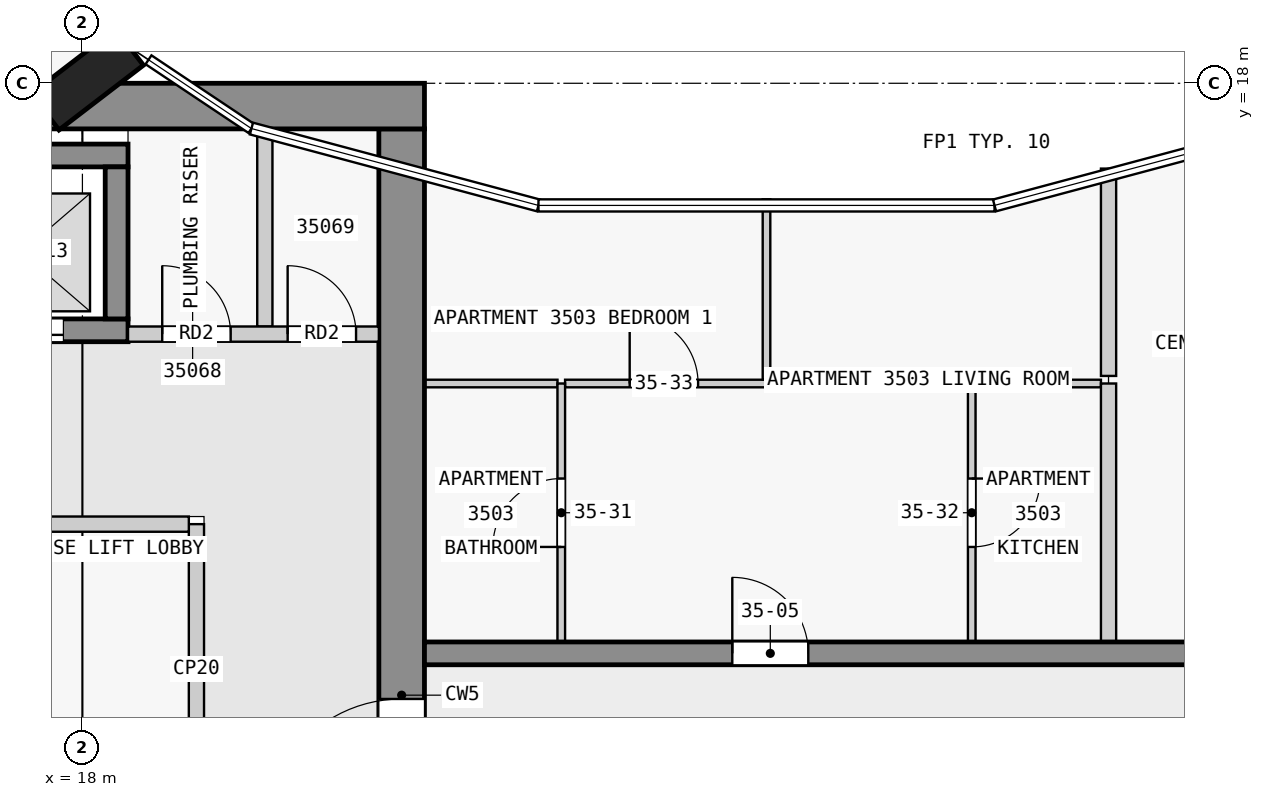
"""IFC4 building model, lengths in metres.
Left out: names, types, materials, properties, quantities, classifications, styles, units other than length and angle.
Written with IfcOpenShell. Run it as: python <this file> out.ifc"""

import sys

from ifc_helpers import new_model, si_unit, direction, frame, frame_2d, origin, origin_2d, place, context, subcontext, project, spatial, rectangle, extrude, element, fill, save


model = new_model("IFC4")
c1 = context("Model", 3, precision=1e-05, world=origin(), true_north=direction((0.0, 1.0)))
c2 = subcontext(c1, "Body", "Model", "MODEL_VIEW")
j1 = project(units=[si_unit("LENGTHUNIT", "METRE"), si_unit("PLANEANGLEUNIT", "RADIAN")], contexts=[c1])
p1 = place(None, origin())
s1 = spatial("IfcSite", under=j1, at=p1, CompositionType="ELEMENT")
p2 = place(p1, origin())
s2 = spatial("IfcBuilding", under=s1, at=p2, CompositionType="ELEMENT")
p3 = place(p2, frame((0.0, 0.0, 139.4)))
s3 = spatial("IfcBuildingStorey", under=s2, at=p3, CompositionType="ELEMENT", Elevation=139.4)
p4 = place(p3, frame((18.065, 18.05, 0.0), z_axis=(0.0, 0.0, 1.0), x_axis=(-0.608810846443, 0.793315418515, 0.0)))
e1 = element("IfcColumn", 1, at=p4, inside=s3, PredefinedType="COLUMN", context=c2, shape_type="SweptSolid", body=[
    extrude(rectangle(XDim=0.6, YDim=1.4, at=origin_2d()), origin(), (0.0, 0.0, 1.0), 3.5),
])
p5 = place(p3, frame((1.38, 17.7, 0.0), z_axis=(0.0, 0.0, 1.0), x_axis=(1.0, 0.0, 0.0)))
e2 = element("IfcWall", 2, at=p5, inside=s3, PredefinedType="SHEAR", context=c2, shape_type="SweptSolid", body=[
    extrude(rectangle(XDim=21.12, YDim=0.6, at=frame_2d((10.56, 0.0))), origin(), (0.0, 0.0, 1.0), 3.25),
])
p6 = place(p5, frame((6.4, 0.0, 0.0)))
e3 = element("IfcOpeningElement", 3, at=p6, cuts=e2, PredefinedType="OPENING", context=c2, shape_type="SweptSolid", body=[
    extrude(rectangle(XDim=1.8, YDim=2.1, at=frame_2d((0.9, 1.05))), frame((0.0, 0.31, 0.0), z_axis=(0.0, -1.0, 0.0), x_axis=(1.0, 0.0, 0.0)), (0.0, 0.0, 1.0), 0.62),
])
p7 = place(p3, frame((22.2, 2.5, 0.0), z_axis=(0.0, 0.0, 1.0), x_axis=(0.0, 1.0, 0.0)))
e4 = element("IfcWall", 4, at=p7, inside=s3, PredefinedType="SHEAR", context=c2, shape_type="SweptSolid", body=[
    extrude(rectangle(XDim=14.9, YDim=0.6, at=frame_2d((7.45, 0.0))), origin(), (0.0, 0.0, 1.0), 3.25),
])
p8 = place(p7, frame((5.6, 0.0, 0.0)))
e5 = element("IfcOpeningElement", 5, at=p8, cuts=e4, PredefinedType="OPENING", context=c2, shape_type="SweptSolid", body=[
    extrude(rectangle(XDim=1.8, YDim=2.1, at=frame_2d((0.9, 1.05))), frame((0.0, 0.31, 0.0), z_axis=(0.0, -1.0, 0.0), x_axis=(1.0, 0.0, 0.0)), (0.0, 0.0, 1.0), 0.62),
])
p9 = place(p3, frame((10.8, 17.05, 0.0), z_axis=(0.0, 0.0, 1.0), x_axis=(1.0, 0.0, 0.0)))
e6 = element("IfcWall", 6, at=p9, inside=s3, PredefinedType="SHEAR", context=c2, shape_type="SweptSolid", body=[
    extrude(rectangle(XDim=7.8, YDim=0.3, at=frame_2d((3.9, 0.0))), origin(), (0.0, 0.0, 1.0), 3.25),
])
p10 = place(p3, frame((10.8, 14.75, 0.0), z_axis=(0.0, 0.0, 1.0), x_axis=(1.0, 0.0, 0.0)))
e7 = element("IfcWall", 7, at=p10, inside=s3, PredefinedType="SHEAR", context=c2, shape_type="SweptSolid", body=[
    extrude(rectangle(XDim=7.8, YDim=0.3, at=frame_2d((3.9, 0.0))), origin(), (0.0, 0.0, 1.0), 3.25),
])
p11 = place(p10, frame((0.85, 0.0, 0.0)))
e8 = element("IfcOpeningElement", 8, at=p11, cuts=e7, PredefinedType="OPENING", context=c2, shape_type="SweptSolid", body=[
    extrude(rectangle(XDim=1.1, YDim=2.1, at=frame_2d((0.55, 1.05))), frame((0.0, 0.16, 0.0), z_axis=(0.0, -1.0, 0.0), x_axis=(1.0, 0.0, 0.0)), (0.0, 0.0, 1.0), 0.32),
])
p12 = place(p10, frame((3.35, 0.0, 0.0)))
e9 = element("IfcOpeningElement", 9, at=p12, cuts=e7, PredefinedType="OPENING", context=c2, shape_type="SweptSolid", body=[
    extrude(rectangle(XDim=1.1, YDim=2.1, at=frame_2d((0.55, 1.05))), frame((0.0, 0.16, 0.0), z_axis=(0.0, -1.0, 0.0), x_axis=(1.0, 0.0, 0.0)), (0.0, 0.0, 1.0), 0.32),
])
p13 = place(p10, frame((5.85, 0.0, 0.0)))
e10 = element("IfcOpeningElement", 10, at=p13, cuts=e7, PredefinedType="OPENING", context=c2, shape_type="SweptSolid", body=[
    extrude(rectangle(XDim=1.1, YDim=2.1, at=frame_2d((0.55, 1.05))), frame((0.0, 0.16, 0.0), z_axis=(0.0, -1.0, 0.0), x_axis=(1.0, 0.0, 0.0)), (0.0, 0.0, 1.0), 0.32),
])
p14 = place(p3, frame((18.45, 14.9, 0.0), z_axis=(0.0, 0.0, 1.0), x_axis=(0.0, 1.0, 0.0)))
e11 = element("IfcWall", 11, at=p14, inside=s3, PredefinedType="SHEAR", context=c2, shape_type="SweptSolid", body=[
    extrude(rectangle(XDim=2.0, YDim=0.3, at=frame_2d((1.0, 0.0))), origin(), (0.0, 0.0, 1.0), 3.25),
])
p15 = place(p3, frame((22.5, 10.5, 0.0), z_axis=(0.0, 0.0, 1.0), x_axis=(1.0, 0.0, 0.0)))
e12 = element("IfcWall", 12, at=p15, inside=s3, PredefinedType="SHEAR", context=c2, shape_type="SweptSolid", body=[
    extrude(rectangle(XDim=22.5, YDim=0.3, at=frame_2d((11.25, 0.0))), origin(), (0.0, 0.0, 1.0), 3.25),
])
p16 = place(p15, frame((4.05, 0.0, 0.0)))
e13 = element("IfcOpeningElement", 13, at=p16, cuts=e12, PredefinedType="OPENING", context=c2, shape_type="SweptSolid", body=[
    extrude(rectangle(XDim=1.0, YDim=2.1, at=frame_2d((0.5, 1.05))), frame((0.0, 0.16, 0.0), z_axis=(0.0, -1.0, 0.0), x_axis=(1.0, 0.0, 0.0)), (0.0, 0.0, 1.0), 0.32),
])
p17 = place(p15, frame((10.85, 0.0, 0.0)))
e14 = element("IfcOpeningElement", 14, at=p17, cuts=e12, PredefinedType="OPENING", context=c2, shape_type="SweptSolid", body=[
    extrude(rectangle(XDim=0.9, YDim=2.1, at=frame_2d((0.45, 1.05))), frame((0.0, 0.16, 0.0), z_axis=(0.0, -1.0, 0.0), x_axis=(1.0, 0.0, 0.0)), (0.0, 0.0, 1.0), 0.32),
])
p18 = place(p15, frame((15.25, 0.0, 0.0)))
e15 = element("IfcOpeningElement", 15, at=p18, cuts=e12, PredefinedType="OPENING", context=c2, shape_type="SweptSolid", body=[
    extrude(rectangle(XDim=1.0, YDim=2.1, at=frame_2d((0.5, 1.05))), frame((0.0, 0.16, 0.0), z_axis=(0.0, -1.0, 0.0), x_axis=(1.0, 0.0, 0.0)), (0.0, 0.0, 1.0), 0.32),
])
p19 = place(p15, frame((18.75, 0.0, 0.0)))
e16 = element("IfcOpeningElement", 16, at=p19, cuts=e12, PredefinedType="OPENING", context=c2, shape_type="SweptSolid", body=[
    extrude(rectangle(XDim=0.9, YDim=2.1, at=frame_2d((0.45, 1.05))), frame((0.0, 0.16, 0.0), z_axis=(0.0, -1.0, 0.0), x_axis=(1.0, 0.0, 0.0)), (0.0, 0.0, 1.0), 0.32),
])
p20 = place(p15, frame((20.95, 0.0, 0.0)))
e17 = element("IfcOpeningElement", 17, at=p20, cuts=e12, PredefinedType="OPENING", context=c2, shape_type="SweptSolid", body=[
    extrude(rectangle(XDim=1.0, YDim=2.1, at=frame_2d((0.5, 1.05))), frame((0.0, 0.16, 0.0), z_axis=(0.0, -1.0, 0.0), x_axis=(1.0, 0.0, 0.0)), (0.0, 0.0, 1.0), 0.32),
])
p21 = place(p3, frame((19.5, 8.4, 0.0), z_axis=(0.0, 0.0, 1.0), x_axis=(0.0, 1.0, 0.0)))
e18 = element("IfcWall", 18, at=p21, inside=s3, PredefinedType="PARTITIONING", context=c2, shape_type="SweptSolid", body=[
    extrude(rectangle(XDim=3.8, YDim=0.2, at=frame_2d((1.9, 0.0))), origin(), (0.0, 0.0, 1.0), 3.25),
])
p22 = place(p3, frame((10.9, 12.2, 0.0), z_axis=(0.0, 0.0, 1.0), x_axis=(1.0, 0.0, 0.0)))
e19 = element("IfcWall", 19, at=p22, inside=s3, PredefinedType="PARTITIONING", context=c2, shape_type="SweptSolid", body=[
    extrude(rectangle(XDim=8.5, YDim=0.2, at=frame_2d((4.25, 0.0))), origin(), (0.0, 0.0, 1.0), 3.25),
])
p23 = place(p22, frame((3.8, 0.0, 0.0)))
e20 = element("IfcOpeningElement", 20, at=p23, cuts=e19, PredefinedType="OPENING", context=c2, shape_type="SweptSolid", body=[
    extrude(rectangle(XDim=0.9, YDim=2.1, at=frame_2d((0.45, 1.05))), frame((0.0, 0.11, 0.0), z_axis=(0.0, -1.0, 0.0), x_axis=(1.0, 0.0, 0.0)), (0.0, 0.0, 1.0), 0.22),
])
p24 = place(p3, frame((18.6, 14.7, 0.0), z_axis=(0.0, 0.0, 1.0), x_axis=(1.0, 0.0, 0.0)))
e21 = element("IfcWall", 21, at=p24, inside=s3, PredefinedType="PARTITIONING", context=c2, shape_type="SweptSolid", body=[
    extrude(rectangle(XDim=3.3, YDim=0.2, at=frame_2d((1.65, 0.0))), origin(), (0.0, 0.0, 1.0), 3.25),
])
p25 = place(p24, frame((0.45, 0.0, 0.0)))
e22 = element("IfcOpeningElement", 22, at=p25, cuts=e21, PredefinedType="OPENING", context=c2, shape_type="SweptSolid", body=[
    extrude(rectangle(XDim=0.9, YDim=2.1, at=frame_2d((0.45, 1.05))), frame((0.0, 0.11, 0.0), z_axis=(0.0, -1.0, 0.0), x_axis=(1.0, 0.0, 0.0)), (0.0, 0.0, 1.0), 0.22),
])
p26 = place(p24, frame((2.1, 0.0, 0.0)))
e23 = element("IfcOpeningElement", 23, at=p26, cuts=e21, PredefinedType="OPENING", context=c2, shape_type="SweptSolid", body=[
    extrude(rectangle(XDim=0.9, YDim=2.1, at=frame_2d((0.45, 1.05))), frame((0.0, 0.11, 0.0), z_axis=(0.0, -1.0, 0.0), x_axis=(1.0, 0.0, 0.0)), (0.0, 0.0, 1.0), 0.22),
])
p27 = place(p3, frame((20.4, 14.8, 0.0), z_axis=(0.0, 0.0, 1.0), x_axis=(0.0, 1.0, 0.0)))
e24 = element("IfcWall", 24, at=p27, inside=s3, PredefinedType="PARTITIONING", context=c2, shape_type="SweptSolid", body=[
    extrude(rectangle(XDim=2.6, YDim=0.2, at=frame_2d((1.3, 0.0))), origin(), (0.0, 0.0, 1.0), 3.25),
])
p28 = place(p3, frame((24.25, 14.05, 0.0), z_axis=(0.0, 0.0, 1.0), x_axis=(-1.0, 0.0, 0.0)))
e25 = element("IfcWall", 25, at=p28, inside=s3, PredefinedType="PARTITIONING", context=c2, shape_type="SweptSolid", body=[
    extrude(rectangle(XDim=1.75, YDim=0.1, at=frame_2d((0.875, 0.0))), origin(), (0.0, 0.0, 1.0), 3.25),
])
p29 = place(p3, frame((31.4, 14.05, 0.0), z_axis=(0.0, 0.0, 1.0), x_axis=(-1.0, 0.0, 0.0)))
e26 = element("IfcWall", 26, at=p29, inside=s3, PredefinedType="PARTITIONING", context=c2, shape_type="SweptSolid", body=[
    extrude(rectangle(XDim=1.65, YDim=0.1, at=frame_2d((0.825, 0.0))), origin(), (0.0, 0.0, 1.0), 3.25),
])
p30 = place(p3, frame((24.35, 14.05, 0.0), z_axis=(0.0, 0.0, 1.0), x_axis=(1.0, 0.0, 0.0)))
e27 = element("IfcWall", 27, at=p30, inside=s3, PredefinedType="PARTITIONING", context=c2, shape_type="SweptSolid", body=[
    extrude(rectangle(XDim=2.65, YDim=0.1, at=frame_2d((1.325, 0.0))), origin(), (0.0, 0.0, 1.0), 3.25),
])
p31 = place(p30, frame((0.85, 0.0, 0.0)))
e28 = element("IfcOpeningElement", 28, at=p31, cuts=e27, PredefinedType="OPENING", context=c2, shape_type="SweptSolid", body=[
    extrude(rectangle(XDim=0.9, YDim=2.1, at=frame_2d((0.45, 1.05))), frame((0.0, 0.06, 0.0), z_axis=(0.0, -1.0, 0.0), x_axis=(1.0, 0.0, 0.0)), (0.0, 0.0, 1.0), 0.12),
])
p32 = place(p3, frame((24.3, 10.65, 0.0), z_axis=(0.0, 0.0, 1.0), x_axis=(0.0, 1.0, 0.0)))
e29 = element("IfcWall", 29, at=p32, inside=s3, PredefinedType="PARTITIONING", context=c2, shape_type="SweptSolid", body=[
    extrude(rectangle(XDim=3.4, YDim=0.1, at=frame_2d((1.7, 0.0))), origin(), (0.0, 0.0, 1.0), 3.25),
])
p33 = place(p32, frame((1.25, 0.0, 0.0)))
e30 = element("IfcOpeningElement", 30, at=p33, cuts=e29, PredefinedType="OPENING", context=c2, shape_type="SweptSolid", body=[
    extrude(rectangle(XDim=0.9, YDim=2.1, at=frame_2d((0.45, 1.05))), frame((0.0, 0.06, 0.0), z_axis=(0.0, -1.0, 0.0), x_axis=(1.0, 0.0, 0.0)), (0.0, 0.0, 1.0), 0.12),
])
p34 = place(p3, frame((27.0, 14.1, 0.0), z_axis=(0.0, 0.0, 1.0), x_axis=(0.0, 1.0, 0.0)))
e31 = element("IfcWall", 31, at=p34, inside=s3, PredefinedType="PARTITIONING", context=c2, shape_type="SweptSolid", body=[
    extrude(rectangle(XDim=2.373, YDim=0.1, at=frame_2d((1.187, 0.0))), origin(), (0.0, 0.0, 1.0), 3.25),
])
p35 = place(p3, frame((29.7, 14.05, 0.0), z_axis=(0.0, 0.0, 1.0), x_axis=(0.0, -1.0, 0.0)))
e32 = element("IfcWall", 32, at=p35, inside=s3, PredefinedType="PARTITIONING", context=c2, shape_type="SweptSolid", body=[
    extrude(rectangle(XDim=3.4, YDim=0.1, at=frame_2d((1.7, 0.0))), origin(), (0.0, 0.0, 1.0), 3.25),
])
p36 = place(p35, frame((1.25, 0.0, 0.0)))
e33 = element("IfcOpeningElement", 33, at=p36, cuts=e32, PredefinedType="OPENING", context=c2, shape_type="SweptSolid", body=[
    extrude(rectangle(XDim=0.9, YDim=2.1, at=frame_2d((0.45, 1.05))), frame((0.0, 0.06, 0.0), z_axis=(0.0, -1.0, 0.0), x_axis=(1.0, 0.0, 0.0)), (0.0, 0.0, 1.0), 0.12),
])
p37 = place(p3, frame((31.5, 16.878, 0.0), z_axis=(0.0, 0.0, 1.0), x_axis=(0.0, -1.0, 0.0)))
e34 = element("IfcWall", 34, at=p37, inside=s3, PredefinedType="PARTITIONING", context=c2, shape_type="SweptSolid", body=[
    extrude(rectangle(XDim=2.728, YDim=0.2, at=frame_2d((1.364, 0.0))), origin(), (0.0, 0.0, 1.0), 3.25),
])
p38 = place(p3, frame((31.5, 10.65, 0.0), z_axis=(0.0, 0.0, 1.0), x_axis=(0.0, 1.0, 0.0)))
e35 = element("IfcWall", 35, at=p38, inside=s3, PredefinedType="PARTITIONING", context=c2, shape_type="SweptSolid", body=[
    extrude(rectangle(XDim=3.4, YDim=0.2, at=frame_2d((1.7, 0.0))), origin(), (0.0, 0.0, 1.0), 3.25),
])
p39 = place(p13, origin())
e36 = element("IfcDoor", 36, at=p39, inside=s3, OperationType="DOUBLE_DOOR_SLIDING", PredefinedType="DOOR", context=c2, shape_type="SweptSolid", body=[
    extrude(rectangle(XDim=1.1, YDim=2.1, at=frame_2d((0.55, 1.05))), frame((0.0, 0.025, 0.0), z_axis=(0.0, -1.0, 0.0), x_axis=(1.0, 0.0, 0.0)), (0.0, 0.0, 1.0), 0.05),
])
fill(e10, e36)
p40 = place(p8, origin())
e37 = element("IfcDoor", 37, at=p40, inside=s3, OperationType="DOUBLE_DOOR_SINGLE_SWING", PredefinedType="DOOR", context=c2, shape_type="SweptSolid", body=[
    extrude(rectangle(XDim=1.8, YDim=2.1, at=frame_2d((0.9, 1.05))), frame((0.0, 0.025, 0.0), z_axis=(0.0, -1.0, 0.0), x_axis=(1.0, 0.0, 0.0)), (0.0, 0.0, 1.0), 0.05),
])
fill(e5, e37)
p41 = place(p25, origin())
e38 = element("IfcDoor", 38, at=p41, inside=s3, OperationType="SINGLE_SWING_LEFT", PredefinedType="DOOR", context=c2, shape_type="SweptSolid", body=[
    extrude(rectangle(XDim=0.9, YDim=2.1, at=frame_2d((0.45, 1.05))), frame((0.0, 0.025, 0.0), z_axis=(0.0, -1.0, 0.0), x_axis=(1.0, 0.0, 0.0)), (0.0, 0.0, 1.0), 0.05),
])
fill(e22, e38)
p42 = place(p26, origin())
e39 = element("IfcDoor", 39, at=p42, inside=s3, OperationType="SINGLE_SWING_LEFT", PredefinedType="DOOR", context=c2, shape_type="SweptSolid", body=[
    extrude(rectangle(XDim=0.9, YDim=2.1, at=frame_2d((0.45, 1.05))), frame((0.0, 0.025, 0.0), z_axis=(0.0, -1.0, 0.0), x_axis=(1.0, 0.0, 0.0)), (0.0, 0.0, 1.0), 0.05),
])
fill(e23, e39)
p43 = place(p16, origin())
e40 = element("IfcDoor", 40, at=p43, inside=s3, OperationType="SINGLE_SWING_LEFT", PredefinedType="DOOR", context=c2, shape_type="SweptSolid", body=[
    extrude(rectangle(XDim=1.0, YDim=2.1, at=frame_2d((0.5, 1.05))), frame((0.0, 0.025, 0.0), z_axis=(0.0, -1.0, 0.0), x_axis=(1.0, 0.0, 0.0)), (0.0, 0.0, 1.0), 0.05),
])
fill(e13, e40)
p44 = place(p33, origin())
e41 = element("IfcDoor", 41, at=p44, inside=s3, OperationType="SINGLE_SWING_LEFT", PredefinedType="DOOR", context=c2, shape_type="SweptSolid", body=[
    extrude(rectangle(XDim=0.9, YDim=2.1, at=frame_2d((0.45, 1.05))), frame((0.0, 0.025, 0.0), z_axis=(0.0, -1.0, 0.0), x_axis=(1.0, 0.0, 0.0)), (0.0, 0.0, 1.0), 0.05),
])
fill(e30, e41)
p45 = place(p36, origin())
e42 = element("IfcDoor", 42, at=p45, inside=s3, OperationType="SINGLE_SWING_LEFT", PredefinedType="DOOR", context=c2, shape_type="SweptSolid", body=[
    extrude(rectangle(XDim=0.9, YDim=2.1, at=frame_2d((0.45, 1.05))), frame((0.0, 0.025, 0.0), z_axis=(0.0, -1.0, 0.0), x_axis=(1.0, 0.0, 0.0)), (0.0, 0.0, 1.0), 0.05),
])
fill(e33, e42)
p46 = place(p31, origin())
e43 = element("IfcDoor", 43, at=p46, inside=s3, OperationType="SINGLE_SWING_LEFT", PredefinedType="DOOR", context=c2, shape_type="SweptSolid", body=[
    extrude(rectangle(XDim=0.9, YDim=2.1, at=frame_2d((0.45, 1.05))), frame((0.0, 0.025, 0.0), z_axis=(0.0, -1.0, 0.0), x_axis=(1.0, 0.0, 0.0)), (0.0, 0.0, 1.0), 0.05),
])
fill(e28, e43)
save(model, sys.argv[1])
